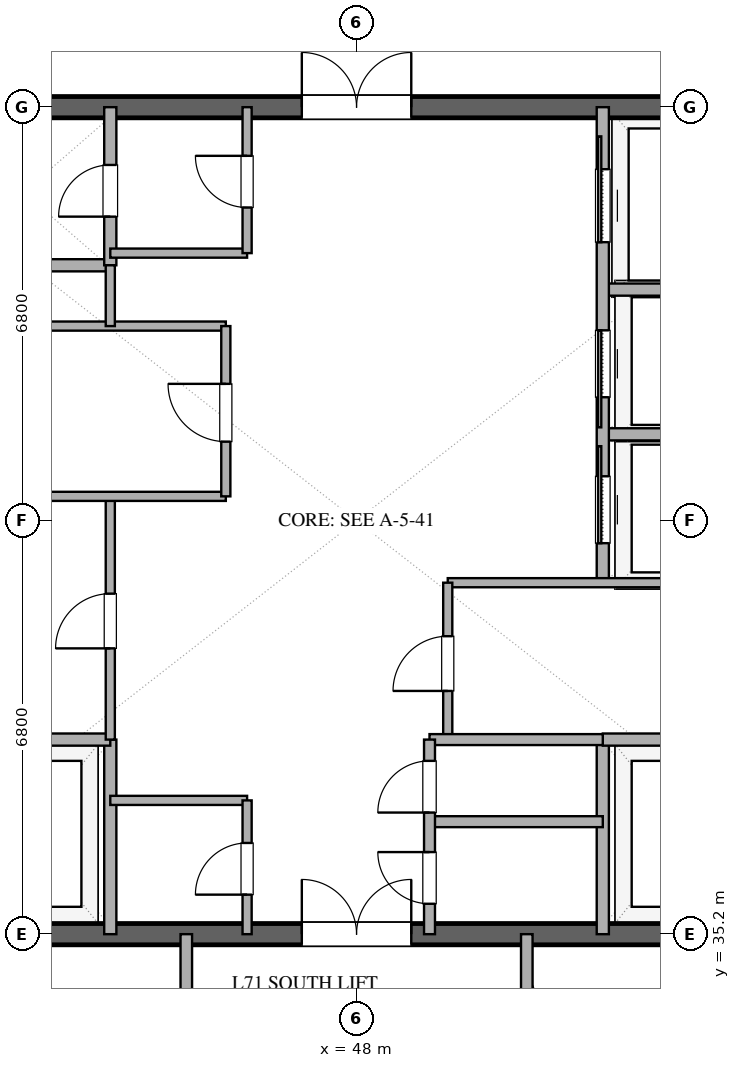
"""IFC4 building model, lengths in metres.
Left out: names, types, materials, properties, quantities, classifications, styles, units other than length and angle.
Written with IfcOpenShell. Run it as: python <this file> out.ifc"""

import sys

from ifc_helpers import new_model, si_unit, direction, frame, frame_2d, origin, place, context, subcontext, project, spatial, rectangle, extrude, element, fill, save


model = new_model("IFC4")
c1 = context("Model", 3, precision=1e-05, world=origin(), true_north=direction((0.0, 1.0)))
c2 = subcontext(c1, "Body", "Model", "MODEL_VIEW")
j1 = project(units=[si_unit("LENGTHUNIT", "METRE"), si_unit("PLANEANGLEUNIT", "RADIAN")], contexts=[c1])
p1 = place(None, origin())
s1 = spatial("IfcSite", under=j1, at=p1, CompositionType="ELEMENT")
p2 = place(p1, origin())
s2 = spatial("IfcBuilding", under=s1, at=p2, CompositionType="ELEMENT")
p3 = place(p2, frame((0.0, 0.0, 276.6)))
s3 = spatial("IfcBuildingStorey", under=s2, at=p3, CompositionType="ELEMENT", Elevation=276.6)
p4 = place(p3, frame((41.0, 35.2, 0.0), z_axis=(0.0, 0.0, 1.0), x_axis=(1.0, 0.0, 0.0)))
e1 = element("IfcWall", 1, at=p4, inside=s3, PredefinedType="SHEAR", context=c2, shape_type="SweptSolid", body=[
    extrude(rectangle(XDim=14.0, YDim=0.35, at=frame_2d((7.0, 0.0))), origin(), (0.0, 0.0, 1.0), 3.37),
])
p5 = place(p4, frame((6.1, 0.0, 0.0)))
e2 = element("IfcOpeningElement", 2, at=p5, cuts=e1, PredefinedType="OPENING", context=c2, shape_type="SweptSolid", body=[
    extrude(rectangle(XDim=1.8, YDim=2.25, at=frame_2d((0.9, 1.125))), frame((0.0, 0.185, 0.0), z_axis=(0.0, -1.0, 0.0), x_axis=(1.0, 0.0, 0.0)), (0.0, 0.0, 1.0), 0.37),
])
p6 = place(p3, frame((41.0, 48.8, 0.0), z_axis=(0.0, 0.0, 1.0), x_axis=(1.0, 0.0, 0.0)))
e3 = element("IfcWall", 3, at=p6, inside=s3, PredefinedType="SHEAR", context=c2, shape_type="SweptSolid", body=[
    extrude(rectangle(XDim=14.0, YDim=0.35, at=frame_2d((7.0, 0.0))), origin(), (0.0, 0.0, 1.0), 3.37),
])
p7 = place(p6, frame((6.1, 0.0, 0.0)))
e4 = element("IfcOpeningElement", 4, at=p7, cuts=e3, PredefinedType="OPENING", context=c2, shape_type="SweptSolid", body=[
    extrude(rectangle(XDim=1.8, YDim=2.25, at=frame_2d((0.9, 1.125))), frame((0.0, 0.185, 0.0), z_axis=(0.0, -1.0, 0.0), x_axis=(1.0, 0.0, 0.0)), (0.0, 0.0, 1.0), 0.37),
])
p8 = place(p3, frame((43.95, 35.2, 0.0), z_axis=(0.0, 0.0, 1.0), x_axis=(0.0, 1.0, 0.0)))
e5 = element("IfcWall", 5, at=p8, inside=s3, PredefinedType="SOLIDWALL", context=c2, shape_type="SweptSolid", body=[
    extrude(rectangle(XDim=3.2, YDim=0.2, at=frame_2d((1.6, 0.0))), origin(), (0.0, 0.0, 1.0), 2.73),
])
p9 = place(p3, frame((41.0, 38.4, 0.0), z_axis=(0.0, 0.0, 1.0), x_axis=(1.0, 0.0, 0.0)))
e6 = element("IfcWall", 6, at=p9, inside=s3, PredefinedType="SOLIDWALL", context=c2, shape_type="SweptSolid", body=[
    extrude(rectangle(XDim=2.95, YDim=0.2, at=frame_2d((1.475, 0.0))), origin(), (0.0, 0.0, 1.0), 2.73),
])
p10 = place(p3, frame((52.05, 35.2, 0.0), z_axis=(0.0, 0.0, 1.0), x_axis=(0.0, 1.0, 0.0)))
e7 = element("IfcWall", 7, at=p10, inside=s3, PredefinedType="SOLIDWALL", context=c2, shape_type="SweptSolid", body=[
    extrude(rectangle(XDim=3.2, YDim=0.2, at=frame_2d((1.6, 0.0))), origin(), (0.0, 0.0, 1.0), 2.73),
])
for number, where, z_axis, x_axis in (
    (8, (52.05, 38.4, 0.0), (0.0, 0.0, 1.0), (1.0, 0.0, 0.0)),
    (9, (41.0, 46.2, 0.0), (0.0, 0.0, 1.0), (1.0, 0.0, 0.0)),
):
    element("IfcWall", number, at=place(p3, frame(where, z_axis=z_axis, x_axis=x_axis)), inside=s3, PredefinedType="SOLIDWALL", context=c2, shape_type="SweptSolid", body=[
        extrude(rectangle(XDim=2.95, YDim=0.2, at=frame_2d((1.475, 0.0))), origin(), (0.0, 0.0, 1.0), 2.73),
    ])
p11 = place(p3, frame((43.95, 46.2, 0.0), z_axis=(0.0, 0.0, 1.0), x_axis=(0.0, 1.0, 0.0)))
e10 = element("IfcWall", 10, at=p11, inside=s3, PredefinedType="SOLIDWALL", context=c2, shape_type="SweptSolid", body=[
    extrude(rectangle(XDim=2.6, YDim=0.2, at=frame_2d((1.3, 0.0))), origin(), (0.0, 0.0, 1.0), 2.73),
])
p12 = place(p11, frame((0.8, 0.0, 0.0)))
e11 = element("IfcOpeningElement", 11, at=p12, cuts=e10, PredefinedType="OPENING", context=c2, shape_type="SweptSolid", body=[
    extrude(rectangle(XDim=0.85, YDim=2.15, at=frame_2d((0.425, 1.075))), frame((0.0, 0.11, 0.0), z_axis=(0.0, -1.0, 0.0), x_axis=(1.0, 0.0, 0.0)), (0.0, 0.0, 1.0), 0.22),
])
p13 = place(p3, frame((43.95, 38.4, 0.0), z_axis=(0.0, 0.0, 1.0), x_axis=(0.0, 1.0, 0.0)))
e12 = element("IfcWall", 12, at=p13, inside=s3, PredefinedType="PARTITIONING", context=c2, shape_type="SweptSolid", body=[
    extrude(rectangle(XDim=4.0, YDim=0.15, at=frame_2d((2.0, 0.0))), origin(), (0.0, 0.0, 1.0), 2.73),
])
p14 = place(p13, frame((1.5, 0.0, 0.0)))
e13 = element("IfcOpeningElement", 13, at=p14, cuts=e12, PredefinedType="OPENING", context=c2, shape_type="SweptSolid", body=[
    extrude(rectangle(XDim=0.9, YDim=2.15, at=frame_2d((0.45, 1.075))), frame((0.0, 0.085, 0.0), z_axis=(0.0, -1.0, 0.0), x_axis=(1.0, 0.0, 0.0)), (0.0, 0.0, 1.0), 0.17),
])
for number, where, z_axis, x_axis in (
    (14, (41.0, 42.4, 0.0), (0.0, 0.0, 1.0), (1.0, 0.0, 0.0)),
    (15, (41.0, 45.2, 0.0), (0.0, 0.0, 1.0), (1.0, 0.0, 0.0)),
):
    element("IfcWall", number, at=place(p3, frame(where, z_axis=z_axis, x_axis=x_axis)), inside=s3, PredefinedType="PARTITIONING", context=c2, shape_type="SweptSolid", body=[
        extrude(rectangle(XDim=4.85, YDim=0.15, at=frame_2d((2.425, 0.0))), origin(), (0.0, 0.0, 1.0), 2.73),
    ])
p15 = place(p3, frame((43.95, 45.2, 0.0), z_axis=(0.0, 0.0, 1.0), x_axis=(0.0, 1.0, 0.0)))
e16 = element("IfcWall", 16, at=p15, inside=s3, PredefinedType="PARTITIONING", context=c2, shape_type="SweptSolid", body=[
    extrude(rectangle(XDim=1.0, YDim=0.15, at=frame_2d((0.5, 0.0))), origin(), (0.0, 0.0, 1.0), 2.73),
])
p16 = place(p3, frame((45.85, 42.4, 0.0), z_axis=(0.0, 0.0, 1.0), x_axis=(0.0, 1.0, 0.0)))
e17 = element("IfcWall", 17, at=p16, inside=s3, PredefinedType="PARTITIONING", context=c2, shape_type="SweptSolid", body=[
    extrude(rectangle(XDim=2.8, YDim=0.15, at=frame_2d((1.4, 0.0))), origin(), (0.0, 0.0, 1.0), 2.73),
])
p17 = place(p16, frame((0.9, 0.0, 0.0)))
e18 = element("IfcOpeningElement", 18, at=p17, cuts=e17, PredefinedType="OPENING", context=c2, shape_type="SweptSolid", body=[
    extrude(rectangle(XDim=0.95, YDim=2.15, at=frame_2d((0.475, 1.075))), frame((0.0, 0.085, 0.0), z_axis=(0.0, -1.0, 0.0), x_axis=(1.0, 0.0, 0.0)), (0.0, 0.0, 1.0), 0.17),
])
for number, where, z_axis, x_axis in (
    (19, (52.05, 43.42, 0.0), (0.0, 0.0, 1.0), (1.0, 0.0, 0.0)),
    (20, (52.05, 45.8, 0.0), (0.0, 0.0, 1.0), (1.0, 0.0, 0.0)),
):
    element("IfcWall", number, at=place(p3, frame(where, z_axis=z_axis, x_axis=x_axis)), inside=s3, PredefinedType="SOLIDWALL", context=c2, shape_type="SweptSolid", body=[
        extrude(rectangle(XDim=2.95, YDim=0.2, at=frame_2d((1.475, 0.0))), origin(), (0.0, 0.0, 1.0), 2.73),
    ])
p18 = place(p3, frame((52.05, 40.98, 0.0), z_axis=(0.0, 0.0, 1.0), x_axis=(0.0, 1.0, 0.0)))
e21 = element("IfcWall", 21, at=p18, inside=s3, PredefinedType="SOLIDWALL", context=c2, shape_type="SweptSolid", body=[
    extrude(rectangle(XDim=7.82, YDim=0.2, at=frame_2d((3.91, 0.0))), origin(), (0.0, 0.0, 1.0), 2.73),
])
p19 = place(p18, frame((0.65, 0.0, 0.0)))
e22 = element("IfcOpeningElement", 22, at=p19, cuts=e21, PredefinedType="OPENING", context=c2, shape_type="SweptSolid", body=[
    extrude(rectangle(XDim=1.1, YDim=2.2, at=frame_2d((0.55, 1.1))), frame((0.0, 0.11, 0.0), z_axis=(0.0, -1.0, 0.0), x_axis=(1.0, 0.0, 0.0)), (0.0, 0.0, 1.0), 0.22),
])
p20 = place(p18, frame((3.05, 0.0, 0.0)))
e23 = element("IfcOpeningElement", 23, at=p20, cuts=e21, PredefinedType="OPENING", context=c2, shape_type="SweptSolid", body=[
    extrude(rectangle(XDim=1.1, YDim=2.2, at=frame_2d((0.55, 1.1))), frame((0.0, 0.11, 0.0), z_axis=(0.0, -1.0, 0.0), x_axis=(1.0, 0.0, 0.0)), (0.0, 0.0, 1.0), 0.22),
])
p21 = place(p18, frame((5.6, 0.0, 0.0)))
e24 = element("IfcOpeningElement", 24, at=p21, cuts=e21, PredefinedType="OPENING", context=c2, shape_type="SweptSolid", body=[
    extrude(rectangle(XDim=1.2, YDim=2.2, at=frame_2d((0.6, 1.1))), frame((0.0, 0.11, 0.0), z_axis=(0.0, -1.0, 0.0), x_axis=(1.0, 0.0, 0.0)), (0.0, 0.0, 1.0), 0.22),
])
p22 = place(p3, frame((49.5, 40.98, 0.0), z_axis=(0.0, 0.0, 1.0), x_axis=(1.0, 0.0, 0.0)))
e25 = element("IfcWall", 25, at=p22, inside=s3, PredefinedType="PARTITIONING", context=c2, shape_type="SweptSolid", body=[
    extrude(rectangle(XDim=5.5, YDim=0.15, at=frame_2d((2.75, 0.0))), origin(), (0.0, 0.0, 1.0), 2.73),
])
p23 = place(p3, frame((49.5, 38.4, 0.0), z_axis=(0.0, 0.0, 1.0), x_axis=(0.0, 1.0, 0.0)))
e26 = element("IfcWall", 26, at=p23, inside=s3, PredefinedType="PARTITIONING", context=c2, shape_type="SweptSolid", body=[
    extrude(rectangle(XDim=2.58, YDim=0.15, at=frame_2d((1.29, 0.0))), origin(), (0.0, 0.0, 1.0), 2.73),
])
p24 = place(p23, frame((0.8, 0.0, 0.0)))
e27 = element("IfcOpeningElement", 27, at=p24, cuts=e26, PredefinedType="OPENING", context=c2, shape_type="SweptSolid", body=[
    extrude(rectangle(XDim=0.9, YDim=2.15, at=frame_2d((0.45, 1.075))), frame((0.0, 0.085, 0.0), z_axis=(0.0, -1.0, 0.0), x_axis=(1.0, 0.0, 0.0)), (0.0, 0.0, 1.0), 0.17),
])
p25 = place(p3, frame((43.95, 37.4, 0.0), z_axis=(0.0, 0.0, 1.0), x_axis=(1.0, 0.0, 0.0)))
e28 = element("IfcWall", 28, at=p25, inside=s3, PredefinedType="PARTITIONING", context=c2, shape_type="SweptSolid", body=[
    extrude(rectangle(XDim=2.25, YDim=0.15, at=frame_2d((1.125, 0.0))), origin(), (0.0, 0.0, 1.0), 2.73),
])
p26 = place(p3, frame((46.2, 35.2, 0.0), z_axis=(0.0, 0.0, 1.0), x_axis=(0.0, 1.0, 0.0)))
e29 = element("IfcWall", 29, at=p26, inside=s3, PredefinedType="PARTITIONING", context=c2, shape_type="SweptSolid", body=[
    extrude(rectangle(XDim=2.2, YDim=0.15, at=frame_2d((1.1, 0.0))), origin(), (0.0, 0.0, 1.0), 2.73),
])
p27 = place(p26, frame((0.65, 0.0, 0.0)))
e30 = element("IfcOpeningElement", 30, at=p27, cuts=e29, PredefinedType="OPENING", context=c2, shape_type="SweptSolid", body=[
    extrude(rectangle(XDim=0.85, YDim=2.15, at=frame_2d((0.425, 1.075))), frame((0.0, 0.085, 0.0), z_axis=(0.0, -1.0, 0.0), x_axis=(1.0, 0.0, 0.0)), (0.0, 0.0, 1.0), 0.17),
])
p28 = place(p3, frame((43.95, 46.4, 0.0), z_axis=(0.0, 0.0, 1.0), x_axis=(1.0, 0.0, 0.0)))
e31 = element("IfcWall", 31, at=p28, inside=s3, PredefinedType="PARTITIONING", context=c2, shape_type="SweptSolid", body=[
    extrude(rectangle(XDim=2.25, YDim=0.15, at=frame_2d((1.125, 0.0))), origin(), (0.0, 0.0, 1.0), 2.73),
])
p29 = place(p3, frame((46.2, 46.4, 0.0), z_axis=(0.0, 0.0, 1.0), x_axis=(0.0, 1.0, 0.0)))
e32 = element("IfcWall", 32, at=p29, inside=s3, PredefinedType="PARTITIONING", context=c2, shape_type="SweptSolid", body=[
    extrude(rectangle(XDim=2.4, YDim=0.15, at=frame_2d((1.2, 0.0))), origin(), (0.0, 0.0, 1.0), 2.73),
])
p30 = place(p29, frame((0.75, 0.0, 0.0)))
e33 = element("IfcOpeningElement", 33, at=p30, cuts=e32, PredefinedType="OPENING", context=c2, shape_type="SweptSolid", body=[
    extrude(rectangle(XDim=0.85, YDim=2.15, at=frame_2d((0.425, 1.075))), frame((0.0, 0.085, 0.0), z_axis=(0.0, -1.0, 0.0), x_axis=(1.0, 0.0, 0.0)), (0.0, 0.0, 1.0), 0.17),
])
for number, where, z_axis, x_axis in (
    (34, (49.2, 37.05, 0.0), (0.0, 0.0, 1.0), (1.0, 0.0, 0.0)),
    (35, (49.2, 38.4, 0.0), (0.0, 0.0, 1.0), (1.0, 0.0, 0.0)),
):
    element("IfcWall", number, at=place(p3, frame(where, z_axis=z_axis, x_axis=x_axis)), inside=s3, PredefinedType="PLUMBINGWALL", context=c2, shape_type="SweptSolid", body=[
        extrude(rectangle(XDim=2.85, YDim=0.18, at=frame_2d((1.425, 0.0))), origin(), (0.0, 0.0, 1.0), 2.73),
    ])
p31 = place(p3, frame((49.2, 35.2, 0.0), z_axis=(0.0, 0.0, 1.0), x_axis=(0.0, 1.0, 0.0)))
e36 = element("IfcWall", 36, at=p31, inside=s3, PredefinedType="PLUMBINGWALL", context=c2, shape_type="SweptSolid", body=[
    extrude(rectangle(XDim=3.2, YDim=0.18, at=frame_2d((1.6, 0.0))), origin(), (0.0, 0.0, 1.0), 2.73),
])
p32 = place(p31, frame((0.5, 0.0, 0.0)))
e37 = element("IfcOpeningElement", 37, at=p32, cuts=e36, PredefinedType="OPENING", context=c2, shape_type="SweptSolid", body=[
    extrude(rectangle(XDim=0.85, YDim=2.1, at=frame_2d((0.425, 1.05))), frame((0.0, 0.1, 0.0), z_axis=(0.0, -1.0, 0.0), x_axis=(1.0, 0.0, 0.0)), (0.0, 0.0, 1.0), 0.2),
])
p33 = place(p31, frame((2.0, 0.0, 0.0)))
e38 = element("IfcOpeningElement", 38, at=p33, cuts=e36, PredefinedType="OPENING", context=c2, shape_type="SweptSolid", body=[
    extrude(rectangle(XDim=0.85, YDim=2.15, at=frame_2d((0.425, 1.075))), frame((0.0, 0.1, 0.0), z_axis=(0.0, -1.0, 0.0), x_axis=(1.0, 0.0, 0.0)), (0.0, 0.0, 1.0), 0.2),
])
p34 = place(p3, frame((50.8, 34.307, 0.0), z_axis=(0.0, 0.0, 1.0), x_axis=(0.342010724278, -0.939696048985, 0.0)))
e39 = element("IfcWall", 39, at=p34, inside=s3, PredefinedType="PARTITIONING", context=c2, shape_type="SweptSolid", body=[
    extrude(rectangle(XDim=8.568, YDim=0.2, at=frame_2d((4.284, 0.0))), origin(), (0.0, 0.0, 1.0), 2.73),
])
for number, where, z_axis, x_axis in (
    (40, (45.2, 33.1, 0.0), (0.0, 0.0, 1.0), (0.0, 1.0, 0.0)),
    (41, (50.8, 35.2, 0.0), (0.0, 0.0, 1.0), (0.0, -1.0, 0.0)),
):
    element("IfcWall", number, at=place(p3, frame(where, z_axis=z_axis, x_axis=x_axis)), inside=s3, PredefinedType="PARTITIONING", context=c2, shape_type="SweptSolid", body=[
        extrude(rectangle(XDim=2.1, YDim=0.19, at=frame_2d((1.05, 0.0))), origin(), (0.0, 0.0, 1.0), 2.73),
    ])
p35 = place(p5, origin())
e42 = element("IfcDoor", 42, at=p35, inside=s3, OperationType="DOUBLE_DOOR_SINGLE_SWING", PredefinedType="DOOR", context=c2, shape_type="SweptSolid", body=[
    extrude(rectangle(XDim=1.8, YDim=2.25, at=frame_2d((0.9, 1.125))), frame((0.0, 0.025, 0.0), z_axis=(0.0, -1.0, 0.0), x_axis=(1.0, 0.0, 0.0)), (0.0, 0.0, 1.0), 0.05),
])
fill(e2, e42)
p36 = place(p7, origin())
e43 = element("IfcDoor", 43, at=p36, inside=s3, OperationType="DOUBLE_DOOR_SINGLE_SWING", PredefinedType="DOOR", context=c2, shape_type="SweptSolid", body=[
    extrude(rectangle(XDim=1.8, YDim=2.25, at=frame_2d((0.9, 1.125))), frame((0.0, 0.025, 0.0), z_axis=(0.0, -1.0, 0.0), x_axis=(1.0, 0.0, 0.0)), (0.0, 0.0, 1.0), 0.05),
])
fill(e4, e43)
p37 = place(p12, origin())
e44 = element("IfcDoor", 44, at=p37, inside=s3, OperationType="SINGLE_SWING_LEFT", PredefinedType="DOOR", context=c2, shape_type="SweptSolid", body=[
    extrude(rectangle(XDim=0.85, YDim=2.15, at=frame_2d((0.425, 1.075))), frame((0.0, 0.025, 0.0), z_axis=(0.0, -1.0, 0.0), x_axis=(1.0, 0.0, 0.0)), (0.0, 0.0, 1.0), 0.05),
])
fill(e11, e44)
p38 = place(p14, origin())
e45 = element("IfcDoor", 45, at=p38, inside=s3, OperationType="SINGLE_SWING_LEFT", PredefinedType="DOOR", context=c2, shape_type="SweptSolid", body=[
    extrude(rectangle(XDim=0.9, YDim=2.15, at=frame_2d((0.45, 1.075))), frame((0.0, 0.025, 0.0), z_axis=(0.0, -1.0, 0.0), x_axis=(1.0, 0.0, 0.0)), (0.0, 0.0, 1.0), 0.05),
])
fill(e13, e45)
p39 = place(p17, origin())
e46 = element("IfcDoor", 46, at=p39, inside=s3, OperationType="SINGLE_SWING_RIGHT", PredefinedType="DOOR", context=c2, shape_type="SweptSolid", body=[
    extrude(rectangle(XDim=0.95, YDim=2.15, at=frame_2d((0.475, 1.075))), frame((0.0, 0.025, 0.0), z_axis=(0.0, -1.0, 0.0), x_axis=(1.0, 0.0, 0.0)), (0.0, 0.0, 1.0), 0.05),
])
fill(e18, e46)
p40 = place(p19, origin())
e47 = element("IfcDoor", 47, at=p40, inside=s3, OperationType="SLIDING_TO_RIGHT", PredefinedType="DOOR", context=c2, shape_type="SweptSolid", body=[
    extrude(rectangle(XDim=1.1, YDim=2.2, at=frame_2d((0.55, 1.1))), frame((0.0, 0.025, 0.0), z_axis=(0.0, -1.0, 0.0), x_axis=(1.0, 0.0, 0.0)), (0.0, 0.0, 1.0), 0.05),
])
fill(e22, e47)
p41 = place(p20, origin())
e48 = element("IfcDoor", 48, at=p41, inside=s3, OperationType="SLIDING_TO_LEFT", PredefinedType="DOOR", context=c2, shape_type="SweptSolid", body=[
    extrude(rectangle(XDim=1.1, YDim=2.2, at=frame_2d((0.55, 1.1))), frame((0.0, 0.025, 0.0), z_axis=(0.0, -1.0, 0.0), x_axis=(1.0, 0.0, 0.0)), (0.0, 0.0, 1.0), 0.05),
])
fill(e23, e48)
p42 = place(p21, origin())
e49 = element("IfcDoor", 49, at=p42, inside=s3, OperationType="SLIDING_TO_RIGHT", PredefinedType="DOOR", context=c2, shape_type="SweptSolid", body=[
    extrude(rectangle(XDim=1.2, YDim=2.2, at=frame_2d((0.6, 1.1))), frame((0.0, 0.025, 0.0), z_axis=(0.0, -1.0, 0.0), x_axis=(1.0, 0.0, 0.0)), (0.0, 0.0, 1.0), 0.05),
])
fill(e24, e49)
p43 = place(p24, origin())
e50 = element("IfcDoor", 50, at=p43, inside=s3, OperationType="SINGLE_SWING_LEFT", PredefinedType="DOOR", context=c2, shape_type="SweptSolid", body=[
    extrude(rectangle(XDim=0.9, YDim=2.15, at=frame_2d((0.45, 1.075))), frame((0.0, 0.025, 0.0), z_axis=(0.0, -1.0, 0.0), x_axis=(1.0, 0.0, 0.0)), (0.0, 0.0, 1.0), 0.05),
])
fill(e27, e50)
p44 = place(p27, origin())
e51 = element("IfcDoor", 51, at=p44, inside=s3, OperationType="SINGLE_SWING_LEFT", PredefinedType="DOOR", context=c2, shape_type="SweptSolid", body=[
    extrude(rectangle(XDim=0.85, YDim=2.15, at=frame_2d((0.425, 1.075))), frame((0.0, 0.025, 0.0), z_axis=(0.0, -1.0, 0.0), x_axis=(1.0, 0.0, 0.0)), (0.0, 0.0, 1.0), 0.05),
])
fill(e30, e51)
p45 = place(p30, origin())
e52 = element("IfcDoor", 52, at=p45, inside=s3, OperationType="SINGLE_SWING_RIGHT", PredefinedType="DOOR", context=c2, shape_type="SweptSolid", body=[
    extrude(rectangle(XDim=0.85, YDim=2.15, at=frame_2d((0.425, 1.075))), frame((0.0, 0.025, 0.0), z_axis=(0.0, -1.0, 0.0), x_axis=(1.0, 0.0, 0.0)), (0.0, 0.0, 1.0), 0.05),
])
fill(e33, e52)
p46 = place(p32, origin())
e53 = element("IfcDoor", 53, at=p46, inside=s3, OperationType="SINGLE_SWING_RIGHT", PredefinedType="DOOR", context=c2, shape_type="SweptSolid", body=[
    extrude(rectangle(XDim=0.85, YDim=2.1, at=frame_2d((0.425, 1.05))), frame((0.0, 0.025, 0.0), z_axis=(0.0, -1.0, 0.0), x_axis=(1.0, 0.0, 0.0)), (0.0, 0.0, 1.0), 0.05),
])
fill(e37, e53)
p47 = place(p33, origin())
e54 = element("IfcDoor", 54, at=p47, inside=s3, OperationType="SINGLE_SWING_LEFT", PredefinedType="DOOR", context=c2, shape_type="SweptSolid", body=[
    extrude(rectangle(XDim=0.85, YDim=2.15, at=frame_2d((0.425, 1.075))), frame((0.0, 0.025, 0.0), z_axis=(0.0, -1.0, 0.0), x_axis=(1.0, 0.0, 0.0)), (0.0, 0.0, 1.0), 0.05),
])
fill(e38, e54)
save(model, sys.argv[1])
